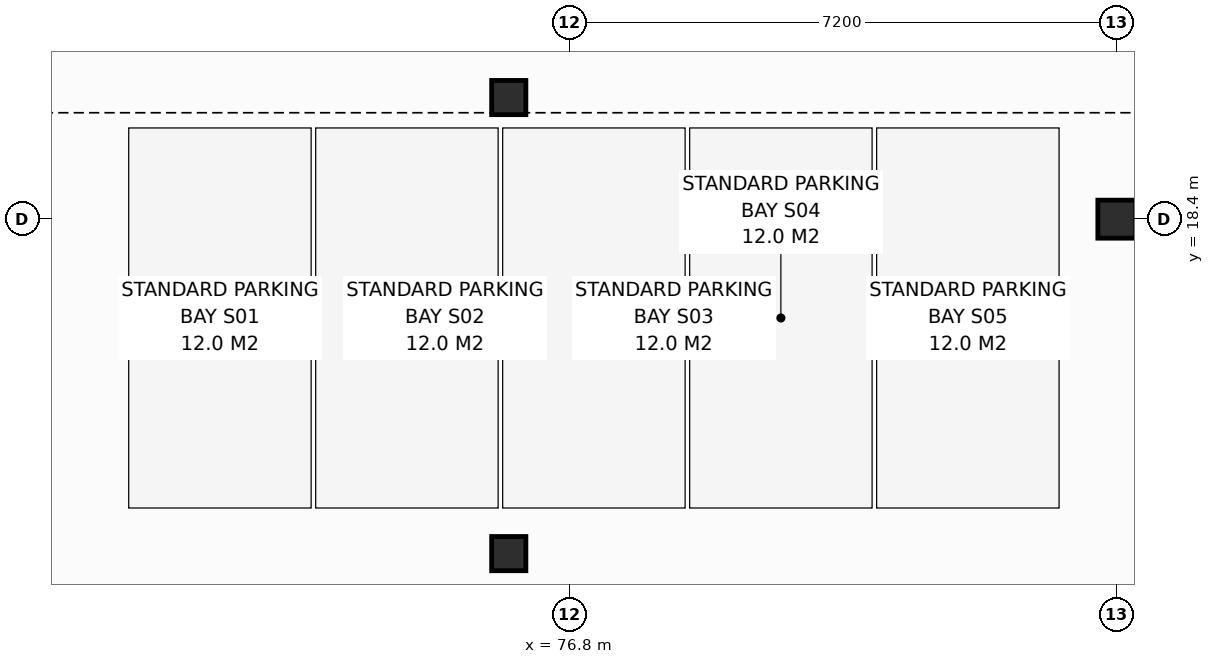
"""IFC4 building model, lengths in metres.
Left out: names, types, materials, properties, quantities, classifications, styles, units other than length and angle.
Written with IfcOpenShell. Run it as: python <this file> out.ifc"""

import sys

from ifc_helpers import new_model, si_unit, direction, frame, origin, origin_2d, place, context, subcontext, project, spatial, rectangle, extrude, element, save


model = new_model("IFC4")
c1 = context("Model", 3, precision=1e-05, world=origin(), true_north=direction((0.0, 1.0)))
c2 = subcontext(c1, "Body", "Model", "MODEL_VIEW")
j1 = project(units=[si_unit("LENGTHUNIT", "METRE"), si_unit("PLANEANGLEUNIT", "RADIAN")], contexts=[c1])
p1 = place(None, origin())
s1 = spatial("IfcSite", under=j1, at=p1, CompositionType="ELEMENT")
p2 = place(p1, origin())
s2 = spatial("IfcBuilding", under=s1, at=p2, CompositionType="ELEMENT")
p3 = place(p2, frame((0.0, 0.0, -3.8)))
s3 = spatial("IfcBuildingStorey", under=s2, at=p3, CompositionType="ELEMENT", Elevation=-3.8)
for number, where, z_axis, x_axis in (
    (1, (76.0, 14.0, 0.0), (0.0, 0.0, 1.0), (1.0, 0.0, 0.0)),
    (2, (76.0, 20.0, 0.0), (0.0, 0.0, 1.0), (1.0, 0.0, 0.0)),
):
    element("IfcColumn", number, at=place(p3, frame(where, z_axis=z_axis, x_axis=x_axis)), inside=s3, PredefinedType="COLUMN", context=c2, shape_type="SweptSolid", body=[
        extrude(rectangle(XDim=0.45, YDim=0.45, at=origin_2d()), origin(), (0.0, 0.0, 1.0), 3.8),
    ])
p4 = place(p3, frame((84.0, 18.4, 0.0), z_axis=(0.0, 0.0, 1.0), x_axis=(1.0, 0.0, 0.0)))
e3 = element("IfcColumn", 3, at=p4, inside=s3, PredefinedType="COLUMN", context=c2, shape_type="SweptSolid", body=[
    extrude(rectangle(XDim=0.5, YDim=0.5, at=origin_2d()), origin(), (0.0, 0.0, 1.0), 3.8),
])
save(model, sys.argv[1])
